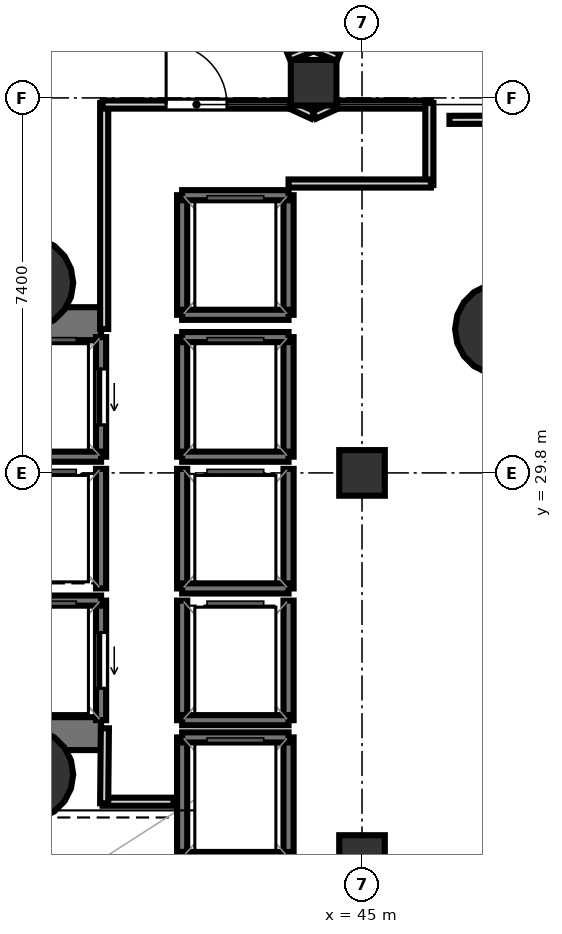
"""IFC4 building model, lengths in metres.
Left out: names, types, materials, properties, quantities, classifications, styles, units other than length and angle.
Written with IfcOpenShell. Run it as: python <this file> out.ifc"""

import sys

from ifc_helpers import new_model, si_unit, direction, frame, frame_2d, origin, origin_2d, place, context, subcontext, project, spatial, rectangle, hollow_circle, extrude, element, fill, save


model = new_model("IFC4")
c1 = context("Model", 3, precision=1e-05, world=origin(), true_north=direction((0.0, 1.0)))
c2 = subcontext(c1, "Body", "Model", "MODEL_VIEW")
j1 = project(units=[si_unit("LENGTHUNIT", "METRE"), si_unit("PLANEANGLEUNIT", "RADIAN")], contexts=[c1])
p1 = place(None, origin())
s1 = spatial("IfcSite", under=j1, at=p1, CompositionType="ELEMENT")
p2 = place(p1, origin())
s2 = spatial("IfcBuilding", under=s1, at=p2, CompositionType="ELEMENT")
p3 = place(p2, frame((0.0, 0.0, 11.0)))
s3 = spatial("IfcBuildingStorey", under=s2, at=p3, CompositionType="ELEMENT", Elevation=11.0)
p4 = place(p3, frame((29.13, 32.745, 0.0), z_axis=(0.0, 0.0, 1.0), x_axis=(1.0, 0.0, 0.0)))
e1 = element("IfcWall", 1, at=p4, inside=s3, PredefinedType="SHEAR", context=c2, shape_type="SweptSolid", body=[
    extrude(rectangle(XDim=10.72, YDim=0.65, at=frame_2d((5.36, 0.0))), origin(), (0.0, 0.0, 1.0), 4.58),
])
p5 = place(p4, frame((1.095, 0.0, 0.0)))
e2 = element("IfcOpeningElement", 2, at=p5, cuts=e1, PredefinedType="OPENING", context=c2, shape_type="SweptSolid", body=[
    extrude(rectangle(XDim=1.25, YDim=2.15, at=frame_2d((0.625, 1.075))), frame((0.0, 0.335, 0.0), z_axis=(0.0, -1.0, 0.0), x_axis=(1.0, 0.0, 0.0)), (0.0, 0.0, 1.0), 0.67),
])
p6 = place(p3, frame((29.13, 24.655, 0.0), z_axis=(0.0, 0.0, 1.0), x_axis=(1.0, 0.0, 0.0)))
e3 = element("IfcWall", 3, at=p6, inside=s3, PredefinedType="SHEAR", context=c2, shape_type="SweptSolid", body=[
    extrude(rectangle(XDim=10.72, YDim=0.65, at=frame_2d((5.36, 0.0))), origin(), (0.0, 0.0, 1.0), 4.58),
])
p7 = place(p6, frame((0.895, 0.0, 0.0)))
e4 = element("IfcOpeningElement", 4, at=p7, cuts=e3, PredefinedType="OPENING", context=c2, shape_type="SweptSolid", body=[
    extrude(rectangle(XDim=1.25, YDim=2.15, at=frame_2d((0.625, 1.075))), frame((0.0, 0.335, 0.0), z_axis=(0.0, -1.0, 0.0), x_axis=(1.0, 0.0, 0.0)), (0.0, 0.0, 1.0), 0.67),
])
for number, where, z_axis, x_axis in (
    (5, (38.4, 33.55, 0.0), (0.0, 0.0, 1.0), (1.0, 0.0, 0.0)),
    (6, (38.4, 23.85, 0.0), (0.0, 0.0, 1.0), (1.0, 0.0, 0.0)),
    (7, (47.736, 32.637, 0.0), (0.0, 0.0, 1.0), (1.0, 0.0, 0.0)),
):
    element("IfcColumn", number, at=place(p3, frame(where, z_axis=z_axis, x_axis=x_axis)), inside=s3, PredefinedType="COLUMN", context=c2, shape_type="SweptSolid", body=[
        extrude(hollow_circle(Radius=0.9, WallThickness=0.045, at=origin_2d()), origin(), (0.0, 0.0, 1.0), 4.8),
    ])
for number, where, z_axis, x_axis in (
    (8, (44.045, 37.5, 0.0), (0.0, 0.0, 1.0), (1.0, 0.0, 0.0)),
    (9, (45.0, 22.2, 0.0), (0.0, 0.0, 1.0), (1.0, 0.0, 0.0)),
    (10, (45.0, 29.8, 0.0), (0.0, 0.0, 1.0), (1.0, 0.0, 0.0)),
):
    element("IfcColumn", number, at=place(p3, frame(where, z_axis=z_axis, x_axis=x_axis)), inside=s3, PredefinedType="COLUMN", context=c2, shape_type="SweptSolid", body=[
        extrude(rectangle(XDim=0.9, YDim=0.9, at=origin_2d()), origin(), (0.0, 0.0, 1.0), 4.8),
    ])
p8 = place(p3, frame((39.85, 30.12, 0.0), z_axis=(0.0, 0.0, 1.0), x_axis=(0.0, 1.0, 0.0)))
e11 = element("IfcWall", 11, at=p8, inside=s3, PredefinedType="SOLIDWALL", context=c2, shape_type="SweptSolid", body=[
    extrude(rectangle(XDim=2.36, YDim=0.2, at=frame_2d((1.18, 0.0))), origin(), (0.0, 0.0, 1.0), 4.58),
])
p9 = place(p8, frame((0.63, 0.0, 0.0)))
e12 = element("IfcOpeningElement", 12, at=p9, cuts=e11, PredefinedType="OPENING", context=c2, shape_type="SweptSolid", body=[
    extrude(rectangle(XDim=1.1, YDim=2.15, at=frame_2d((0.55, 1.075))), frame((0.0, 0.11, 0.0), z_axis=(0.0, -1.0, 0.0), x_axis=(1.0, 0.0, 0.0)), (0.0, 0.0, 1.0), 0.22),
])
p10 = place(p3, frame((37.75, 30.12, 0.0), z_axis=(0.0, 0.0, 1.0), x_axis=(1.0, 0.0, 0.0)))
e13 = element("IfcWall", 13, at=p10, inside=s3, PredefinedType="SOLIDWALL", context=c2, shape_type="SweptSolid", body=[
    extrude(rectangle(XDim=2.1, YDim=0.2, at=frame_2d((1.05, 0.0))), origin(), (0.0, 0.0, 1.0), 4.58),
])
p11 = place(p3, frame((39.85, 24.92, 0.0), z_axis=(0.0, 0.0, 1.0), x_axis=(0.0, 1.0, 0.0)))
e14 = element("IfcWall", 14, at=p11, inside=s3, PredefinedType="SOLIDWALL", context=c2, shape_type="SweptSolid", body=[
    extrude(rectangle(XDim=2.36, YDim=0.2, at=frame_2d((1.18, 0.0))), origin(), (0.0, 0.0, 1.0), 4.58),
])
p12 = place(p11, frame((0.63, 0.0, 0.0)))
e15 = element("IfcOpeningElement", 15, at=p12, cuts=e14, PredefinedType="OPENING", context=c2, shape_type="SweptSolid", body=[
    extrude(rectangle(XDim=1.1, YDim=2.15, at=frame_2d((0.55, 1.075))), frame((0.0, 0.11, 0.0), z_axis=(0.0, -1.0, 0.0), x_axis=(1.0, 0.0, 0.0)), (0.0, 0.0, 1.0), 0.22),
])
p13 = place(p3, frame((37.75, 27.28, 0.0), z_axis=(0.0, 0.0, 1.0), x_axis=(1.0, 0.0, 0.0)))
e16 = element("IfcWall", 16, at=p13, inside=s3, PredefinedType="SOLIDWALL", context=c2, shape_type="SweptSolid", body=[
    extrude(rectangle(XDim=2.1, YDim=0.2, at=frame_2d((1.05, 0.0))), origin(), (0.0, 0.0, 1.0), 4.58),
])
for number, where, z_axis, x_axis in (
    (17, (43.55, 30.12, 0.0), (0.0, 0.0, 1.0), (0.0, 1.0, 0.0)),
    (18, (41.45, 30.12, 0.0), (0.0, 0.0, 1.0), (0.0, 1.0, 0.0)),
):
    element("IfcWall", number, at=place(p3, frame(where, z_axis=z_axis, x_axis=x_axis)), inside=s3, PredefinedType="SOLIDWALL", context=c2, shape_type="SweptSolid", body=[
        extrude(rectangle(XDim=2.36, YDim=0.2, at=frame_2d((1.18, 0.0))), origin(), (0.0, 0.0, 1.0), 4.58),
    ])
for number, where, z_axis, x_axis in (
    (19, (41.45, 32.48, 0.0), (0.0, 0.0, 1.0), (1.0, 0.0, 0.0)),
    (20, (41.45, 30.12, 0.0), (0.0, 0.0, 1.0), (1.0, 0.0, 0.0)),
):
    element("IfcWall", number, at=place(p3, frame(where, z_axis=z_axis, x_axis=x_axis)), inside=s3, PredefinedType="SOLIDWALL", context=c2, shape_type="SweptSolid", body=[
        extrude(rectangle(XDim=2.1, YDim=0.2, at=frame_2d((1.05, 0.0))), origin(), (0.0, 0.0, 1.0), 4.58),
    ])
for number, where, z_axis, x_axis in (
    (21, (43.55, 27.52, 0.0), (0.0, 0.0, 1.0), (0.0, 1.0, 0.0)),
    (22, (41.45, 27.52, 0.0), (0.0, 0.0, 1.0), (0.0, 1.0, 0.0)),
):
    element("IfcWall", number, at=place(p3, frame(where, z_axis=z_axis, x_axis=x_axis)), inside=s3, PredefinedType="SOLIDWALL", context=c2, shape_type="SweptSolid", body=[
        extrude(rectangle(XDim=2.36, YDim=0.2, at=frame_2d((1.18, 0.0))), origin(), (0.0, 0.0, 1.0), 4.58),
    ])
p14 = place(p3, frame((41.45, 27.52, 0.0), z_axis=(0.0, 0.0, 1.0), x_axis=(1.0, 0.0, 0.0)))
e23 = element("IfcWall", 23, at=p14, inside=s3, PredefinedType="SOLIDWALL", context=c2, shape_type="SweptSolid", body=[
    extrude(rectangle(XDim=2.1, YDim=0.2, at=frame_2d((1.05, 0.0))), origin(), (0.0, 0.0, 1.0), 4.58),
])
for number, where, z_axis, x_axis in (
    (24, (43.55, 24.92, 0.0), (0.0, 0.0, 1.0), (0.0, 1.0, 0.0)),
    (25, (41.45, 24.92, 0.0), (0.0, 0.0, 1.0), (0.0, 1.0, 0.0)),
):
    element("IfcWall", number, at=place(p3, frame(where, z_axis=z_axis, x_axis=x_axis)), inside=s3, PredefinedType="SOLIDWALL", context=c2, shape_type="SweptSolid", body=[
        extrude(rectangle(XDim=2.36, YDim=0.2, at=frame_2d((1.18, 0.0))), origin(), (0.0, 0.0, 1.0), 4.58),
    ])
p15 = place(p3, frame((41.45, 24.92, 0.0), z_axis=(0.0, 0.0, 1.0), x_axis=(1.0, 0.0, 0.0)))
e26 = element("IfcWall", 26, at=p15, inside=s3, PredefinedType="SOLIDWALL", context=c2, shape_type="SweptSolid", body=[
    extrude(rectangle(XDim=2.1, YDim=0.2, at=frame_2d((1.05, 0.0))), origin(), (0.0, 0.0, 1.0), 4.58),
])
p16 = place(p3, frame((39.85, 27.52, 0.0), z_axis=(0.0, 0.0, 1.0), x_axis=(0.0, 1.0, 0.0)))
e27 = element("IfcWall", 27, at=p16, inside=s3, PredefinedType="SOLIDWALL", context=c2, shape_type="SweptSolid", body=[
    extrude(rectangle(XDim=2.36, YDim=0.2, at=frame_2d((1.18, 0.0))), origin(), (0.0, 0.0, 1.0), 4.58),
])
for number, where, z_axis, x_axis in (
    (28, (43.55, 22.22, 0.0), (0.0, 0.0, 1.0), (0.0, 1.0, 0.0)),
    (29, (41.45, 22.22, 0.0), (0.0, 0.0, 1.0), (0.0, 1.0, 0.0)),
):
    element("IfcWall", number, at=place(p3, frame(where, z_axis=z_axis, x_axis=x_axis)), inside=s3, PredefinedType="SOLIDWALL", context=c2, shape_type="SweptSolid", body=[
        extrude(rectangle(XDim=2.36, YDim=0.2, at=frame_2d((1.18, 0.0))), origin(), (0.0, 0.0, 1.0), 4.58),
    ])
for number, where, z_axis, x_axis in (
    (30, (41.45, 24.58, 0.0), (0.0, 0.0, 1.0), (1.0, 0.0, 0.0)),
    (31, (41.45, 22.22, 0.0), (0.0, 0.0, 1.0), (1.0, 0.0, 0.0)),
):
    element("IfcWall", number, at=place(p3, frame(where, z_axis=z_axis, x_axis=x_axis)), inside=s3, PredefinedType="SOLIDWALL", context=c2, shape_type="SweptSolid", body=[
        extrude(rectangle(XDim=2.1, YDim=0.2, at=frame_2d((1.05, 0.0))), origin(), (0.0, 0.0, 1.0), 4.58),
    ])
for number, where, z_axis, x_axis in (
    (32, (43.55, 32.92, 0.0), (0.0, 0.0, 1.0), (0.0, 1.0, 0.0)),
    (33, (41.45, 32.92, 0.0), (0.0, 0.0, 1.0), (0.0, 1.0, 0.0)),
):
    element("IfcWall", number, at=place(p3, frame(where, z_axis=z_axis, x_axis=x_axis)), inside=s3, PredefinedType="SOLIDWALL", context=c2, shape_type="SweptSolid", body=[
        extrude(rectangle(XDim=2.36, YDim=0.2, at=frame_2d((1.18, 0.0))), origin(), (0.0, 0.0, 1.0), 4.58),
    ])
for number, where, z_axis, x_axis in (
    (34, (41.45, 35.28, 0.0), (0.0, 0.0, 1.0), (1.0, 0.0, 0.0)),
    (35, (41.45, 32.92, 0.0), (0.0, 0.0, 1.0), (1.0, 0.0, 0.0)),
):
    element("IfcWall", number, at=place(p3, frame(where, z_axis=z_axis, x_axis=x_axis)), inside=s3, PredefinedType="SOLIDWALL", context=c2, shape_type="SweptSolid", body=[
        extrude(rectangle(XDim=2.1, YDim=0.2, at=frame_2d((1.05, 0.0))), origin(), (0.0, 0.0, 1.0), 4.58),
    ])
p17 = place(p3, frame((39.911, 32.64, 0.0), z_axis=(0.0, 0.0, 1.0), x_axis=(0.0, 1.0, 0.0)))
e36 = element("IfcWall", 36, at=p17, inside=s3, PredefinedType="PARTITIONING", context=c2, shape_type="SweptSolid", body=[
    extrude(rectangle(XDim=4.46, YDim=0.16, at=frame_2d((2.23, 0.0))), origin(), (0.0, 0.0, 1.0), 3.1),
])
p18 = place(p3, frame((39.88, 37.069, 0.0), z_axis=(0.0, 0.0, 1.0), x_axis=(1.0, 0.0, 0.0)))
e37 = element("IfcWall", 37, at=p18, inside=s3, PredefinedType="PARTITIONING", context=c2, shape_type="SweptSolid", body=[
    extrude(rectangle(XDim=3.708, YDim=0.16, at=frame_2d((1.854, 0.0))), origin(), (0.0, 0.0, 1.0), 3.1),
])
p19 = place(p18, frame((1.254, 0.0, 0.0)))
e38 = element("IfcOpeningElement", 38, at=p19, cuts=e37, PredefinedType="OPENING", context=c2, shape_type="SweptSolid", body=[
    extrude(rectangle(XDim=1.2, YDim=2.15, at=frame_2d((0.6, 1.075))), frame((0.0, 0.09, 0.0), z_axis=(0.0, -1.0, 0.0), x_axis=(1.0, 0.0, 0.0)), (0.0, 0.0, 1.0), 0.18),
])
for number, where, z_axis, x_axis in (
    (39, (43.575, 37.072, 0.0), (0.0, 0.0, 1.0), (0.909, -0.417, 0.0)),
    (40, (44.058, 36.862, 0.0), (0.0, 0.0, 1.0), (0.909, 0.417, 0.0)),
):
    element("IfcWall", number, at=place(p3, frame(where, z_axis=z_axis, x_axis=x_axis)), inside=s3, PredefinedType="PARTITIONING", context=c2, shape_type="SweptSolid", body=[
        extrude(rectangle(XDim=0.503, YDim=0.16, at=frame_2d((0.251, 0.0))), origin(), (0.0, 0.0, 1.0), 3.1),
    ])
p20 = place(p3, frame((44.502, 37.069, 0.0), z_axis=(0.0, 0.0, 1.0), x_axis=(1.0, 0.0, 0.0)))
e41 = element("IfcWall", 41, at=p20, inside=s3, PredefinedType="PARTITIONING", context=c2, shape_type="SweptSolid", body=[
    extrude(rectangle(XDim=1.858, YDim=0.16, at=frame_2d((0.929, 0.0))), origin(), (0.0, 0.0, 1.0), 3.1),
])
p21 = place(p3, frame((46.329, 37.1, 0.0), z_axis=(0.0, 0.0, 1.0), x_axis=(0.0, -1.0, 0.0)))
e42 = element("IfcWall", 42, at=p21, inside=s3, PredefinedType="PARTITIONING", context=c2, shape_type="SweptSolid", body=[
    extrude(rectangle(XDim=1.62, YDim=0.16, at=frame_2d((0.81, 0.0))), origin(), (0.0, 0.0, 1.0), 3.1),
])
p22 = place(p3, frame((46.36, 35.511, 0.0), z_axis=(0.0, 0.0, 1.0), x_axis=(-1.0, 0.0, 0.0)))
e43 = element("IfcWall", 43, at=p22, inside=s3, PredefinedType="PARTITIONING", context=c2, shape_type="SweptSolid", body=[
    extrude(rectangle(XDim=2.81, YDim=0.16, at=frame_2d((1.405, 0.0))), origin(), (0.0, 0.0, 1.0), 3.1),
])
p23 = place(p3, frame((41.28, 23.311, 0.0), z_axis=(0.0, 0.0, 1.0), x_axis=(-1.0, 0.0, 0.0)))
e44 = element("IfcWall", 44, at=p23, inside=s3, PredefinedType="PARTITIONING", context=c2, shape_type="SweptSolid", body=[
    extrude(rectangle(XDim=1.4, YDim=0.16, at=frame_2d((0.7, 0.0))), origin(), (0.0, 0.0, 1.0), 3.1),
])
p24 = place(p3, frame((39.911, 23.28, 0.0), z_axis=(0.0, 0.0, 1.0), x_axis=(0.009397771291, 0.999955839972, 0.0)))
e45 = element("IfcWall", 45, at=p24, inside=s3, PredefinedType="PARTITIONING", context=c2, shape_type="SweptSolid", body=[
    extrude(rectangle(XDim=1.481, YDim=0.16, at=frame_2d((0.74, 0.0))), origin(), (0.0, 0.0, 1.0), 3.1),
])
p25 = place(p3, frame((55.65, 36.789, 0.0), z_axis=(0.0, 0.0, 1.0), x_axis=(-0.999996901459, -0.002489391821, 0.0)))
e46 = element("IfcWall", 46, at=p25, inside=s3, PredefinedType="PARTITIONING", context=c2, shape_type="SweptSolid", body=[
    extrude(rectangle(XDim=8.925, YDim=0.16, at=frame_2d((4.462, 0.0))), origin(), (0.0, 0.0, 1.0), 3.1),
])
p26 = place(p3, frame((44.53, 38.002, 0.0), z_axis=(0.0, 0.0, 1.0), x_axis=(-0.924045828763, 0.382281710714, 0.0)))
e47 = element("IfcWall", 47, at=p26, inside=s3, PredefinedType="PARTITIONING", context=c2, shape_type="SweptSolid", body=[
    extrude(rectangle(XDim=0.513, YDim=0.16, at=frame_2d((0.256, 0.0))), origin(), (0.0, 0.0, 1.0), 3.1),
])
p27 = place(p3, frame((44.033, 38.198, 0.0), z_axis=(0.0, 0.0, 1.0), x_axis=(-0.923976210744, -0.382449947024, 0.0)))
e48 = element("IfcWall", 48, at=p27, inside=s3, PredefinedType="PARTITIONING", context=c2, shape_type="SweptSolid", body=[
    extrude(rectangle(XDim=0.513, YDim=0.16, at=frame_2d((0.256, 0.0))), origin(), (0.0, 0.0, 1.0), 3.1),
])
p28 = place(p9, origin())
e49 = element("IfcDoor", 49, at=p28, inside=s3, OperationType="SLIDING_TO_LEFT", PredefinedType="DOOR", context=c2, shape_type="SweptSolid", body=[
    extrude(rectangle(XDim=1.1, YDim=2.15, at=frame_2d((0.55, 1.075))), frame((0.0, 0.025, 0.0), z_axis=(0.0, -1.0, 0.0), x_axis=(1.0, 0.0, 0.0)), (0.0, 0.0, 1.0), 0.05),
])
fill(e12, e49)
p29 = place(p12, origin())
e50 = element("IfcDoor", 50, at=p29, inside=s3, OperationType="SLIDING_TO_LEFT", PredefinedType="DOOR", context=c2, shape_type="SweptSolid", body=[
    extrude(rectangle(XDim=1.1, YDim=2.15, at=frame_2d((0.55, 1.075))), frame((0.0, 0.025, 0.0), z_axis=(0.0, -1.0, 0.0), x_axis=(1.0, 0.0, 0.0)), (0.0, 0.0, 1.0), 0.05),
])
fill(e15, e50)
p30 = place(p19, origin())
e51 = element("IfcDoor", 51, at=p30, inside=s3, OperationType="SINGLE_SWING_LEFT", PredefinedType="DOOR", context=c2, shape_type="SweptSolid", body=[
    extrude(rectangle(XDim=1.2, YDim=2.15, at=frame_2d((0.6, 1.075))), frame((0.0, 0.025, 0.0), z_axis=(0.0, -1.0, 0.0), x_axis=(1.0, 0.0, 0.0)), (0.0, 0.0, 1.0), 0.05),
])
fill(e38, e51)
save(model, sys.argv[1])
